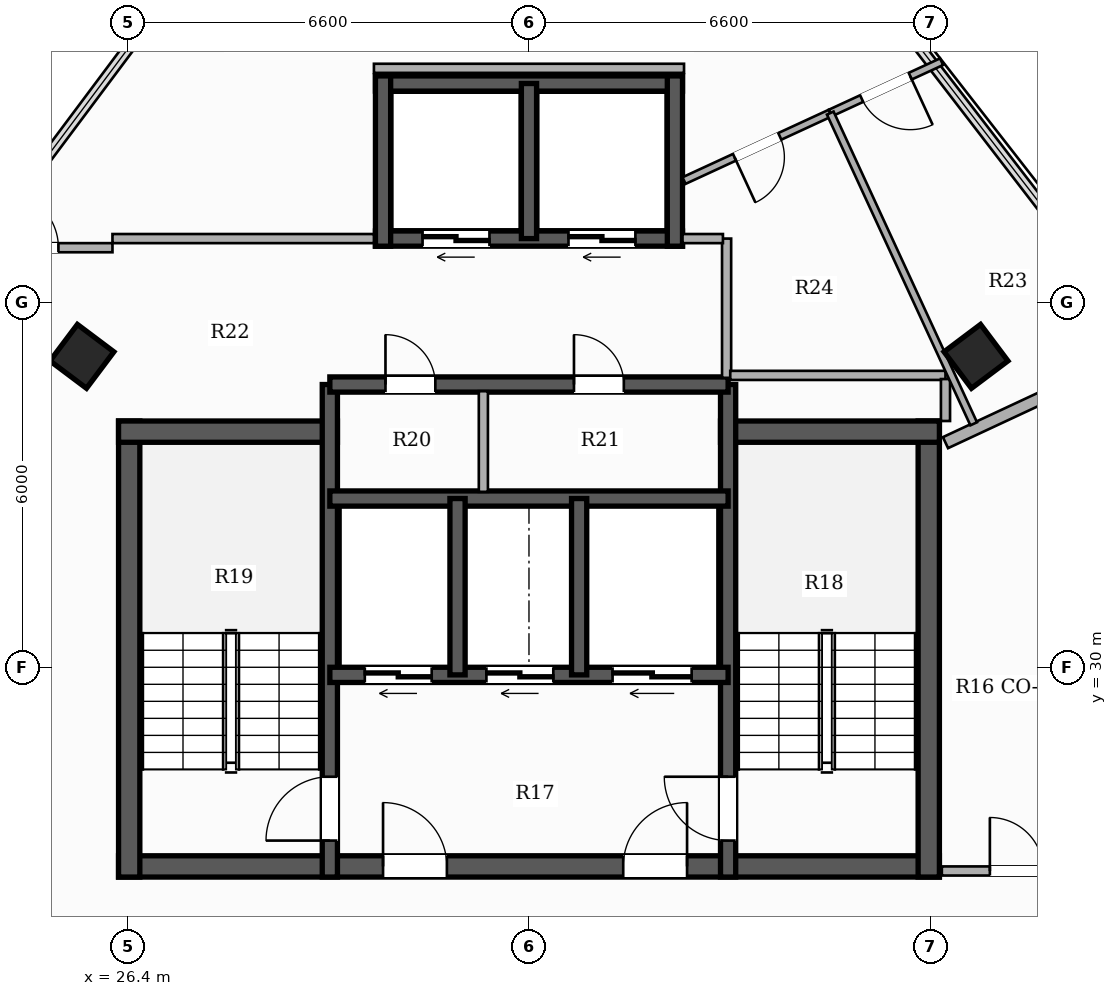
"""IFC4 building model, lengths in metres.
Left out: names, types, materials, properties, quantities, classifications, styles, units other than length and angle.
Written with IfcOpenShell. Run it as: python <this file> out.ifc"""

import sys

from ifc_helpers import new_model, si_unit, direction, frame, frame_2d, origin, origin_2d, place, context, subcontext, project, spatial, rectangle, hollow_rectangle, extrude, element, fill, save


model = new_model("IFC4")
c1 = context("Model", 3, precision=1e-05, world=origin(), true_north=direction((0.0, 1.0)))
c2 = subcontext(c1, "Body", "Model", "MODEL_VIEW")
j1 = project(units=[si_unit("LENGTHUNIT", "METRE"), si_unit("PLANEANGLEUNIT", "RADIAN")], contexts=[c1])
p1 = place(None, origin())
s1 = spatial("IfcSite", under=j1, at=p1, CompositionType="ELEMENT")
p2 = place(p1, origin())
s2 = spatial("IfcBuilding", under=s1, at=p2, CompositionType="ELEMENT")
p3 = place(p2, frame((0.0, 0.0, 203.0)))
s3 = spatial("IfcBuildingStorey", under=s2, at=p3, CompositionType="ELEMENT", Elevation=203.0)
p4 = place(p3, frame((26.25, 26.725, 0.0), z_axis=(0.0, 0.0, 1.0), x_axis=(1.0, 0.0, 0.0)))
e1 = element("IfcWall", 1, at=p4, inside=s3, PredefinedType="SHEAR", context=c2, shape_type="SweptSolid", body=[
    extrude(rectangle(XDim=13.5, YDim=0.35, at=frame_2d((6.75, 0.0))), origin(), (0.0, 0.0, 1.0), 3.3),
])
p5 = place(p4, frame((4.35, 0.0, 0.0)))
e2 = element("IfcOpeningElement", 2, at=p5, cuts=e1, PredefinedType="OPENING", context=c2, shape_type="SweptSolid", body=[
    extrude(rectangle(XDim=1.05, YDim=2.15, at=frame_2d((0.525, 1.075))), frame((0.0, 0.185, 0.0), z_axis=(0.0, -1.0, 0.0), x_axis=(1.0, 0.0, 0.0)), (0.0, 0.0, 1.0), 0.37),
])
p6 = place(p4, frame((8.3, 0.0, 0.0)))
e3 = element("IfcOpeningElement", 3, at=p6, cuts=e1, PredefinedType="OPENING", context=c2, shape_type="SweptSolid", body=[
    extrude(rectangle(XDim=1.05, YDim=2.15, at=frame_2d((0.525, 1.075))), frame((0.0, 0.185, 0.0), z_axis=(0.0, -1.0, 0.0), x_axis=(1.0, 0.0, 0.0)), (0.0, 0.0, 1.0), 0.37),
])
p7 = place(p3, frame((26.425, 26.55, 0.0), z_axis=(0.0, 0.0, 1.0), x_axis=(0.0, 1.0, 0.0)))
e4 = element("IfcWall", 4, at=p7, inside=s3, PredefinedType="SHEAR", context=c2, shape_type="SweptSolid", body=[
    extrude(rectangle(XDim=7.5, YDim=0.35, at=frame_2d((3.75, 0.0))), origin(), (0.0, 0.0, 1.0), 3.3),
])
p8 = place(p3, frame((26.25, 33.875, 0.0), z_axis=(0.0, 0.0, 1.0), x_axis=(1.0, 0.0, 0.0)))
e5 = element("IfcWall", 5, at=p8, inside=s3, PredefinedType="SHEAR", context=c2, shape_type="SweptSolid", body=[
    extrude(rectangle(XDim=3.6, YDim=0.35, at=frame_2d((1.8, 0.0))), origin(), (0.0, 0.0, 1.0), 3.3),
])
p9 = place(p3, frame((39.575, 26.55, 0.0), z_axis=(0.0, 0.0, 1.0), x_axis=(0.0, 1.0, 0.0)))
e6 = element("IfcWall", 6, at=p9, inside=s3, PredefinedType="SHEAR", context=c2, shape_type="SweptSolid", body=[
    extrude(rectangle(XDim=7.5, YDim=0.35, at=frame_2d((3.75, 0.0))), origin(), (0.0, 0.0, 1.0), 3.3),
])
p10 = place(p3, frame((36.15, 33.875, 0.0), z_axis=(0.0, 0.0, 1.0), x_axis=(1.0, 0.0, 0.0)))
e7 = element("IfcWall", 7, at=p10, inside=s3, PredefinedType="SHEAR", context=c2, shape_type="SweptSolid", body=[
    extrude(rectangle(XDim=3.6, YDim=0.35, at=frame_2d((1.8, 0.0))), origin(), (0.0, 0.0, 1.0), 3.3),
])
p11 = place(p3, frame((29.725, 26.55, 0.0), z_axis=(0.0, 0.0, 1.0), x_axis=(0.0, 1.0, 0.0)))
e8 = element("IfcWall", 8, at=p11, inside=s3, PredefinedType="SHEAR", context=c2, shape_type="SweptSolid", body=[
    extrude(rectangle(XDim=8.1, YDim=0.25, at=frame_2d((4.05, 0.0))), origin(), (0.0, 0.0, 1.0), 3.3),
])
p12 = place(p11, frame((0.6, 0.0, 0.0)))
e9 = element("IfcOpeningElement", 9, at=p12, cuts=e8, PredefinedType="OPENING", context=c2, shape_type="SweptSolid", body=[
    extrude(rectangle(XDim=1.05, YDim=2.15, at=frame_2d((0.525, 1.075))), frame((0.0, 0.135, 0.0), z_axis=(0.0, -1.0, 0.0), x_axis=(1.0, 0.0, 0.0)), (0.0, 0.0, 1.0), 0.27),
])
p13 = place(p3, frame((36.275, 26.55, 0.0), z_axis=(0.0, 0.0, 1.0), x_axis=(0.0, 1.0, 0.0)))
e10 = element("IfcWall", 10, at=p13, inside=s3, PredefinedType="SHEAR", context=c2, shape_type="SweptSolid", body=[
    extrude(rectangle(XDim=8.1, YDim=0.25, at=frame_2d((4.05, 0.0))), origin(), (0.0, 0.0, 1.0), 3.3),
])
p14 = place(p13, frame((0.6, 0.0, 0.0)))
e11 = element("IfcOpeningElement", 11, at=p14, cuts=e10, PredefinedType="OPENING", context=c2, shape_type="SweptSolid", body=[
    extrude(rectangle(XDim=1.05, YDim=2.15, at=frame_2d((0.525, 1.075))), frame((0.0, 0.135, 0.0), z_axis=(0.0, -1.0, 0.0), x_axis=(1.0, 0.0, 0.0)), (0.0, 0.0, 1.0), 0.27),
])
p15 = place(p3, frame((36.275, 29.875, 0.0), z_axis=(0.0, 0.0, 1.0), x_axis=(-1.0, 0.0, 0.0)))
e12 = element("IfcWall", 12, at=p15, inside=s3, PredefinedType="SHEAR", context=c2, shape_type="SweptSolid", body=[
    extrude(rectangle(XDim=6.55, YDim=0.25, at=frame_2d((3.275, 0.0))), origin(), (0.0, 0.0, 1.0), 3.3),
])
p16 = place(p15, frame((4.875, 0.0, 0.0)))
e13 = element("IfcOpeningElement", 13, at=p16, cuts=e12, PredefinedType="OPENING", context=c2, shape_type="SweptSolid", body=[
    extrude(rectangle(XDim=1.1, YDim=2.2, at=frame_2d((0.55, 1.1))), frame((0.0, 0.135, 0.0), z_axis=(0.0, -1.0, 0.0), x_axis=(1.0, 0.0, 0.0)), (0.0, 0.0, 1.0), 0.27),
])
p17 = place(p15, frame((2.875, 0.0, 0.0)))
e14 = element("IfcOpeningElement", 14, at=p17, cuts=e12, PredefinedType="OPENING", context=c2, shape_type="SweptSolid", body=[
    extrude(rectangle(XDim=1.1, YDim=2.2, at=frame_2d((0.55, 1.1))), frame((0.0, 0.135, 0.0), z_axis=(0.0, -1.0, 0.0), x_axis=(1.0, 0.0, 0.0)), (0.0, 0.0, 1.0), 0.27),
])
p18 = place(p15, frame((0.6, 0.0, 0.0)))
e15 = element("IfcOpeningElement", 15, at=p18, cuts=e12, PredefinedType="OPENING", context=c2, shape_type="SweptSolid", body=[
    extrude(rectangle(XDim=1.3, YDim=2.2, at=frame_2d((0.65, 1.1))), frame((0.0, 0.135, 0.0), z_axis=(0.0, -1.0, 0.0), x_axis=(1.0, 0.0, 0.0)), (0.0, 0.0, 1.0), 0.27),
])
p19 = place(p3, frame((29.725, 32.775, 0.0), z_axis=(0.0, 0.0, 1.0), x_axis=(1.0, 0.0, 0.0)))
e16 = element("IfcWall", 16, at=p19, inside=s3, PredefinedType="SHEAR", context=c2, shape_type="SweptSolid", body=[
    extrude(rectangle(XDim=6.55, YDim=0.25, at=frame_2d((3.275, 0.0))), origin(), (0.0, 0.0, 1.0), 3.3),
])
for number, where, z_axis, x_axis in (
    (17, (31.825, 29.875, 0.0), (0.0, 0.0, 1.0), (0.0, 1.0, 0.0)),
    (18, (33.825, 29.875, 0.0), (0.0, 0.0, 1.0), (0.0, 1.0, 0.0)),
):
    element("IfcWall", number, at=place(p3, frame(where, z_axis=z_axis, x_axis=x_axis)), inside=s3, PredefinedType="SHEAR", context=c2, shape_type="SweptSolid", body=[
        extrude(rectangle(XDim=2.9, YDim=0.25, at=frame_2d((1.45, 0.0))), origin(), (0.0, 0.0, 1.0), 3.3),
    ])
p20 = place(p3, frame((29.725, 34.65, 0.0), z_axis=(0.0, 0.0, 1.0), x_axis=(1.0, 0.0, 0.0)))
e19 = element("IfcWall", 19, at=p20, inside=s3, PredefinedType="SHEAR", context=c2, shape_type="SweptSolid", body=[
    extrude(rectangle(XDim=6.55, YDim=0.25, at=frame_2d((3.275, 0.0))), origin(), (0.0, 0.0, 1.0), 3.3),
])
p21 = place(p20, frame((0.915, 0.0, 0.0)))
e20 = element("IfcOpeningElement", 20, at=p21, cuts=e19, PredefinedType="OPENING", context=c2, shape_type="SweptSolid", body=[
    extrude(rectangle(XDim=0.82, YDim=2.1, at=frame_2d((0.41, 1.05))), frame((0.0, 0.135, 0.0), z_axis=(0.0, -1.0, 0.0), x_axis=(1.0, 0.0, 0.0)), (0.0, 0.0, 1.0), 0.27),
])
p22 = place(p20, frame((4.015, 0.0, 0.0)))
e21 = element("IfcOpeningElement", 21, at=p22, cuts=e19, PredefinedType="OPENING", context=c2, shape_type="SweptSolid", body=[
    extrude(rectangle(XDim=0.82, YDim=2.1, at=frame_2d((0.41, 1.05))), frame((0.0, 0.135, 0.0), z_axis=(0.0, -1.0, 0.0), x_axis=(1.0, 0.0, 0.0)), (0.0, 0.0, 1.0), 0.27),
])
p23 = place(p3, frame((35.525, 37.05, 0.0), z_axis=(0.0, 0.0, 1.0), x_axis=(-1.0, 0.0, 0.0)))
e22 = element("IfcWall", 22, at=p23, inside=s3, PredefinedType="SHEAR", context=c2, shape_type="SweptSolid", body=[
    extrude(rectangle(XDim=5.05, YDim=0.25, at=frame_2d((2.525, 0.0))), origin(), (0.0, 0.0, 1.0), 3.3),
])
p24 = place(p23, frame((3.175, 0.0, 0.0)))
e23 = element("IfcOpeningElement", 23, at=p24, cuts=e22, PredefinedType="OPENING", context=c2, shape_type="SweptSolid", body=[
    extrude(rectangle(XDim=1.1, YDim=2.2, at=frame_2d((0.55, 1.1))), frame((0.0, 0.135, 0.0), z_axis=(0.0, -1.0, 0.0), x_axis=(1.0, 0.0, 0.0)), (0.0, 0.0, 1.0), 0.27),
])
p25 = place(p23, frame((0.775, 0.0, 0.0)))
e24 = element("IfcOpeningElement", 24, at=p25, cuts=e22, PredefinedType="OPENING", context=c2, shape_type="SweptSolid", body=[
    extrude(rectangle(XDim=1.1, YDim=2.2, at=frame_2d((0.55, 1.1))), frame((0.0, 0.135, 0.0), z_axis=(0.0, -1.0, 0.0), x_axis=(1.0, 0.0, 0.0)), (0.0, 0.0, 1.0), 0.27),
])
p26 = place(p3, frame((30.475, 39.6, 0.0), z_axis=(0.0, 0.0, 1.0), x_axis=(1.0, 0.0, 0.0)))
e25 = element("IfcWall", 25, at=p26, inside=s3, PredefinedType="SHEAR", context=c2, shape_type="SweptSolid", body=[
    extrude(rectangle(XDim=5.05, YDim=0.25, at=frame_2d((2.525, 0.0))), origin(), (0.0, 0.0, 1.0), 3.3),
])
for number, where, z_axis, x_axis in (
    (26, (30.6, 36.925, 0.0), (0.0, 0.0, 1.0), (0.0, 1.0, 0.0)),
    (27, (35.4, 36.925, 0.0), (0.0, 0.0, 1.0), (0.0, 1.0, 0.0)),
):
    element("IfcWall", number, at=place(p3, frame(where, z_axis=z_axis, x_axis=x_axis)), inside=s3, PredefinedType="SHEAR", context=c2, shape_type="SweptSolid", body=[
        extrude(rectangle(XDim=2.8, YDim=0.25, at=frame_2d((1.4, 0.0))), origin(), (0.0, 0.0, 1.0), 3.3),
    ])
p27 = place(p3, frame((33.0, 37.05, 0.0), z_axis=(0.0, 0.0, 1.0), x_axis=(0.0, 1.0, 0.0)))
e28 = element("IfcWall", 28, at=p27, inside=s3, PredefinedType="SHEAR", context=c2, shape_type="SweptSolid", body=[
    extrude(rectangle(XDim=2.55, YDim=0.25, at=frame_2d((1.275, 0.0))), origin(), (0.0, 0.0, 1.0), 3.3),
])
for number, where, z_axis, x_axis in (
    (29, (25.648, 35.113, 0.0), (0.0, 0.0, 1.0), (0.6, 0.8, 0.0)),
    (30, (40.352, 35.113, 0.0), (0.0, 0.0, 1.0), (-0.6, 0.8, 0.0)),
):
    element("IfcColumn", number, at=place(p3, frame(where, z_axis=z_axis, x_axis=x_axis)), inside=s3, PredefinedType="COLUMN", context=c2, shape_type="SweptSolid", body=[
        extrude(hollow_rectangle(XDim=0.75, YDim=0.75, WallThickness=0.025, at=origin_2d()), origin(), (0.0, 0.0, 1.0), 3.3),
    ])
p28 = place(p3, frame((36.25, 34.76, 0.0), z_axis=(0.0, 0.0, 1.0), x_axis=(0.0, 1.0, 0.0)))
e31 = element("IfcWall", 31, at=p28, inside=s3, PredefinedType="PARTITIONING", context=c2, shape_type="SweptSolid", body=[
    extrude(rectangle(XDim=2.29, YDim=0.15, at=frame_2d((1.145, 0.0))), origin(), (0.0, 0.0, 1.0), 2.425),
])
p29 = place(p3, frame((35.525, 37.05, 0.0), z_axis=(0.0, 0.0, 1.0), x_axis=(1.0, 0.0, 0.0)))
e32 = element("IfcWall", 32, at=p29, inside=s3, PredefinedType="PARTITIONING", context=c2, shape_type="SweptSolid", body=[
    extrude(rectangle(XDim=0.665, YDim=0.15, at=frame_2d((0.333, 0.0))), origin(), (0.0, 0.0, 1.0), 2.425),
])
p30 = place(p3, frame((32.25, 32.885, 0.0), z_axis=(0.0, 0.0, 1.0), x_axis=(0.0, 1.0, 0.0)))
e33 = element("IfcWall", 33, at=p30, inside=s3, PredefinedType="PARTITIONING", context=c2, shape_type="SweptSolid", body=[
    extrude(rectangle(XDim=1.655, YDim=0.15, at=frame_2d((0.828, 0.0))), origin(), (0.0, 0.0, 1.0), 3.06),
])
p31 = place(p3, frame((23.831, 36.9, 0.0), z_axis=(0.0, 0.0, 1.0), x_axis=(1.0, 0.0, 0.0)))
e34 = element("IfcWall", 34, at=p31, inside=s3, PredefinedType="PARTITIONING", context=c2, shape_type="SweptSolid", body=[
    extrude(rectangle(XDim=2.319, YDim=0.15, at=frame_2d((1.159, 0.0))), origin(), (0.0, 0.0, 1.0), 2.619),
])
p32 = place(p31, frame((0.51, 0.0, 0.0)))
e35 = element("IfcOpeningElement", 35, at=p32, cuts=e34, PredefinedType="OPENING", context=c2, shape_type="SweptSolid", body=[
    extrude(rectangle(XDim=0.92, YDim=2.15, at=frame_2d((0.46, 1.075))), frame((0.0, 0.085, 0.0), z_axis=(0.0, -1.0, 0.0), x_axis=(1.0, 0.0, 0.0)), (0.0, 0.0, 1.0), 0.17),
])
p33 = place(p3, frame((39.79, 26.65, 0.0), z_axis=(0.0, 0.0, 1.0), x_axis=(1.0, 0.0, 0.0)))
e36 = element("IfcWall", 36, at=p33, inside=s3, PredefinedType="PARTITIONING", context=c2, shape_type="SweptSolid", body=[
    extrude(rectangle(XDim=2.46, YDim=0.15, at=frame_2d((1.23, 0.0))), origin(), (0.0, 0.0, 1.0), 2.565),
])
p34 = place(p33, frame((0.79, 0.0, 0.0)))
e37 = element("IfcOpeningElement", 37, at=p34, cuts=e36, PredefinedType="OPENING", context=c2, shape_type="SweptSolid", body=[
    extrude(rectangle(XDim=0.88, YDim=2.1, at=frame_2d((0.44, 1.05))), frame((0.0, 0.085, 0.0), z_axis=(0.0, -1.0, 0.0), x_axis=(1.0, 0.0, 0.0)), (0.0, 0.0, 1.0), 0.17),
])
p35 = place(p3, frame((26.15, 37.05, 0.0), z_axis=(0.0, 0.0, 1.0), x_axis=(1.0, 0.0, 0.0)))
e38 = element("IfcWall", 38, at=p35, inside=s3, PredefinedType="PARTITIONING", context=c2, shape_type="SweptSolid", body=[
    extrude(rectangle(XDim=4.3, YDim=0.15, at=frame_2d((2.15, 0.0))), origin(), (0.0, 0.0, 1.0), 2.425),
])
p36 = place(p3, frame((30.45, 39.85, 0.0), z_axis=(0.0, 0.0, 1.0), x_axis=(1.0, 0.0, 0.0)))
e39 = element("IfcWall", 39, at=p36, inside=s3, PredefinedType="PARTITIONING", context=c2, shape_type="SweptSolid", body=[
    extrude(rectangle(XDim=5.1, YDim=0.15, at=frame_2d((2.55, 0.0))), origin(), (0.0, 0.0, 1.0), 2.492),
])
p37 = place(p3, frame((36.31, 34.8, 0.0), z_axis=(0.0, 0.0, 1.0), x_axis=(1.0, 0.0, 0.0)))
e40 = element("IfcWall", 40, at=p37, inside=s3, PredefinedType="PARTITIONING", context=c2, shape_type="SweptSolid", body=[
    extrude(rectangle(XDim=3.54, YDim=0.15, at=frame_2d((1.77, 0.0))), origin(), (0.0, 0.0, 1.0), 2.425),
])
p38 = place(p3, frame((39.85, 34.74, 0.0), z_axis=(0.0, 0.0, 1.0), x_axis=(0.0, -1.0, 0.0)))
e41 = element("IfcWall", 41, at=p38, inside=s3, PredefinedType="PARTITIONING", context=c2, shape_type="SweptSolid", body=[
    extrude(rectangle(XDim=0.69, YDim=0.15, at=frame_2d((0.345, 0.0))), origin(), (0.0, 0.0, 1.0), 2.773),
])
p39 = place(p3, frame((43.289, 35.298, 0.0), z_axis=(0.0, 0.0, 1.0), x_axis=(-0.906268592738, -0.422702304011, 0.0)))
e42 = element("IfcWall", 42, at=p39, inside=s3, PredefinedType="PARTITIONING", context=c2, shape_type="SweptSolid", body=[
    extrude(rectangle(XDim=3.795, YDim=0.2, at=frame_2d((1.897, 0.0))), origin(), (0.0, 0.0, 1.0), 2.492),
])
p40 = place(p3, frame((37.955, 39.114, 0.0), z_axis=(0.0, 0.0, 1.0), x_axis=(-0.907945896046, -0.41908740121, 0.0)))
e43 = element("IfcWall", 43, at=p40, inside=s3, PredefinedType="PARTITIONING", context=c2, shape_type="SweptSolid", body=[
    extrude(rectangle(XDim=2.649, YDim=0.12, at=frame_2d((1.324, 0.0))), origin(), (0.0, 0.0, 1.0), 2.492),
])
p41 = place(p40, frame((0.914, 0.0, 0.0)))
e44 = element("IfcOpeningElement", 44, at=p41, cuts=e43, PredefinedType="OPENING", context=c2, shape_type="SweptSolid", body=[
    extrude(rectangle(XDim=0.82, YDim=2.1, at=frame_2d((0.41, 1.05))), frame((0.0, 0.07, 0.0), z_axis=(0.0, -1.0, 0.0), x_axis=(1.0, 0.0, 0.0)), (0.0, 0.0, 1.0), 0.14),
])
p42 = place(p3, frame((39.786, 39.959, 0.0), z_axis=(0.0, 0.0, 1.0), x_axis=(-0.90796292821, -0.419050499338, 0.0)))
e45 = element("IfcWall", 45, at=p42, inside=s3, PredefinedType="PARTITIONING", context=c2, shape_type="SweptSolid", body=[
    extrude(rectangle(XDim=2.016, YDim=0.12, at=frame_2d((1.008, 0.0))), origin(), (0.0, 0.0, 1.0), 3.06),
])
p43 = place(p42, frame((0.568, 0.0, 0.0)))
e46 = element("IfcOpeningElement", 46, at=p43, cuts=e45, PredefinedType="OPENING", context=c2, shape_type="SweptSolid", body=[
    extrude(rectangle(XDim=0.88, YDim=2.1, at=frame_2d((0.44, 1.05))), frame((0.0, 0.07, 0.0), z_axis=(0.0, -1.0, 0.0), x_axis=(1.0, 0.0, 0.0)), (0.0, 0.0, 1.0), 0.14),
])
p44 = place(p3, frame((37.955, 39.114, 0.0), z_axis=(0.0, 0.0, 1.0), x_axis=(0.41911319203, -0.907933991139, 0.0)))
e47 = element("IfcWall", 47, at=p44, inside=s3, PredefinedType="PARTITIONING", context=c2, shape_type="SweptSolid", body=[
    extrude(rectangle(XDim=5.628, YDim=0.12, at=frame_2d((2.814, 0.0))), origin(), (0.0, 0.0, 1.0), 2.492),
])
p45 = place(p12, origin())
e48 = element("IfcDoor", 48, at=p45, inside=s3, OperationType="SINGLE_SWING_LEFT", PredefinedType="DOOR", context=c2, shape_type="SweptSolid", body=[
    extrude(rectangle(XDim=1.05, YDim=2.15, at=frame_2d((0.525, 1.075))), frame((0.0, 0.025, 0.0), z_axis=(0.0, -1.0, 0.0), x_axis=(1.0, 0.0, 0.0)), (0.0, 0.0, 1.0), 0.05),
])
fill(e9, e48)
p46 = place(p14, origin())
e49 = element("IfcDoor", 49, at=p46, inside=s3, OperationType="SINGLE_SWING_RIGHT", PredefinedType="DOOR", context=c2, shape_type="SweptSolid", body=[
    extrude(rectangle(XDim=1.05, YDim=2.15, at=frame_2d((0.525, 1.075))), frame((0.0, 0.025, 0.0), z_axis=(0.0, -1.0, 0.0), x_axis=(1.0, 0.0, 0.0)), (0.0, 0.0, 1.0), 0.05),
])
fill(e11, e49)
p47 = place(p5, origin())
e50 = element("IfcDoor", 50, at=p47, inside=s3, OperationType="SINGLE_SWING_LEFT", PredefinedType="DOOR", context=c2, shape_type="SweptSolid", body=[
    extrude(rectangle(XDim=1.05, YDim=2.15, at=frame_2d((0.525, 1.075))), frame((0.0, 0.025, 0.0), z_axis=(0.0, -1.0, 0.0), x_axis=(1.0, 0.0, 0.0)), (0.0, 0.0, 1.0), 0.05),
])
fill(e2, e50)
p48 = place(p6, origin())
e51 = element("IfcDoor", 51, at=p48, inside=s3, OperationType="SINGLE_SWING_RIGHT", PredefinedType="DOOR", context=c2, shape_type="SweptSolid", body=[
    extrude(rectangle(XDim=1.05, YDim=2.15, at=frame_2d((0.525, 1.075))), frame((0.0, 0.025, 0.0), z_axis=(0.0, -1.0, 0.0), x_axis=(1.0, 0.0, 0.0)), (0.0, 0.0, 1.0), 0.05),
])
fill(e3, e51)
p49 = place(p16, origin())
e52 = element("IfcDoor", 52, at=p49, inside=s3, OperationType="DOUBLE_DOOR_SLIDING", PredefinedType="DOOR", context=c2, shape_type="SweptSolid", body=[
    extrude(rectangle(XDim=1.1, YDim=2.2, at=frame_2d((0.55, 1.1))), frame((0.0, 0.025, 0.0), z_axis=(0.0, -1.0, 0.0), x_axis=(1.0, 0.0, 0.0)), (0.0, 0.0, 1.0), 0.05),
])
fill(e13, e52)
p50 = place(p17, origin())
e53 = element("IfcDoor", 53, at=p50, inside=s3, OperationType="DOUBLE_DOOR_SLIDING", PredefinedType="DOOR", context=c2, shape_type="SweptSolid", body=[
    extrude(rectangle(XDim=1.1, YDim=2.2, at=frame_2d((0.55, 1.1))), frame((0.0, 0.025, 0.0), z_axis=(0.0, -1.0, 0.0), x_axis=(1.0, 0.0, 0.0)), (0.0, 0.0, 1.0), 0.05),
])
fill(e14, e53)
p51 = place(p18, origin())
e54 = element("IfcDoor", 54, at=p51, inside=s3, OperationType="DOUBLE_DOOR_SLIDING", PredefinedType="DOOR", context=c2, shape_type="SweptSolid", body=[
    extrude(rectangle(XDim=1.3, YDim=2.2, at=frame_2d((0.65, 1.1))), frame((0.0, 0.025, 0.0), z_axis=(0.0, -1.0, 0.0), x_axis=(1.0, 0.0, 0.0)), (0.0, 0.0, 1.0), 0.05),
])
fill(e15, e54)
p52 = place(p24, origin())
e55 = element("IfcDoor", 55, at=p52, inside=s3, OperationType="DOUBLE_DOOR_SLIDING", PredefinedType="DOOR", context=c2, shape_type="SweptSolid", body=[
    extrude(rectangle(XDim=1.1, YDim=2.2, at=frame_2d((0.55, 1.1))), frame((0.0, 0.025, 0.0), z_axis=(0.0, -1.0, 0.0), x_axis=(1.0, 0.0, 0.0)), (0.0, 0.0, 1.0), 0.05),
])
fill(e23, e55)
p53 = place(p25, origin())
e56 = element("IfcDoor", 56, at=p53, inside=s3, OperationType="DOUBLE_DOOR_SLIDING", PredefinedType="DOOR", context=c2, shape_type="SweptSolid", body=[
    extrude(rectangle(XDim=1.1, YDim=2.2, at=frame_2d((0.55, 1.1))), frame((0.0, 0.025, 0.0), z_axis=(0.0, -1.0, 0.0), x_axis=(1.0, 0.0, 0.0)), (0.0, 0.0, 1.0), 0.05),
])
fill(e24, e56)
p54 = place(p21, origin())
e57 = element("IfcDoor", 57, at=p54, inside=s3, OperationType="SINGLE_SWING_LEFT", PredefinedType="DOOR", context=c2, shape_type="SweptSolid", body=[
    extrude(rectangle(XDim=0.82, YDim=2.1, at=frame_2d((0.41, 1.05))), frame((0.0, 0.025, 0.0), z_axis=(0.0, -1.0, 0.0), x_axis=(1.0, 0.0, 0.0)), (0.0, 0.0, 1.0), 0.05),
])
fill(e20, e57)
p55 = place(p22, origin())
e58 = element("IfcDoor", 58, at=p55, inside=s3, OperationType="SINGLE_SWING_LEFT", PredefinedType="DOOR", context=c2, shape_type="SweptSolid", body=[
    extrude(rectangle(XDim=0.82, YDim=2.1, at=frame_2d((0.41, 1.05))), frame((0.0, 0.025, 0.0), z_axis=(0.0, -1.0, 0.0), x_axis=(1.0, 0.0, 0.0)), (0.0, 0.0, 1.0), 0.05),
])
fill(e21, e58)
p56 = place(p32, origin())
e59 = element("IfcDoor", 59, at=p56, inside=s3, OperationType="SINGLE_SWING_LEFT", PredefinedType="DOOR", context=c2, shape_type="SweptSolid", body=[
    extrude(rectangle(XDim=0.92, YDim=2.15, at=frame_2d((0.46, 1.075))), frame((0.0, 0.025, 0.0), z_axis=(0.0, -1.0, 0.0), x_axis=(1.0, 0.0, 0.0)), (0.0, 0.0, 1.0), 0.05),
])
fill(e35, e59)
p57 = place(p41, origin())
e60 = element("IfcDoor", 60, at=p57, inside=s3, OperationType="SINGLE_SWING_RIGHT", PredefinedType="DOOR", context=c2, shape_type="SweptSolid", body=[
    extrude(rectangle(XDim=0.82, YDim=2.1, at=frame_2d((0.41, 1.05))), frame((0.0, 0.025, 0.0), z_axis=(0.0, -1.0, 0.0), x_axis=(1.0, 0.0, 0.0)), (0.0, 0.0, 1.0), 0.05),
])
fill(e44, e60)
p58 = place(p43, origin())
e61 = element("IfcDoor", 61, at=p58, inside=s3, OperationType="SINGLE_SWING_LEFT", PredefinedType="DOOR", context=c2, shape_type="SweptSolid", body=[
    extrude(rectangle(XDim=0.88, YDim=2.1, at=frame_2d((0.44, 1.05))), frame((0.0, 0.025, 0.0), z_axis=(0.0, -1.0, 0.0), x_axis=(1.0, 0.0, 0.0)), (0.0, 0.0, 1.0), 0.05),
])
fill(e46, e61)
p59 = place(p34, origin())
e62 = element("IfcDoor", 62, at=p59, inside=s3, OperationType="SINGLE_SWING_LEFT", PredefinedType="DOOR", context=c2, shape_type="SweptSolid", body=[
    extrude(rectangle(XDim=0.88, YDim=2.1, at=frame_2d((0.44, 1.05))), frame((0.0, 0.025, 0.0), z_axis=(0.0, -1.0, 0.0), x_axis=(1.0, 0.0, 0.0)), (0.0, 0.0, 1.0), 0.05),
])
fill(e37, e62)
save(model, sys.argv[1])
